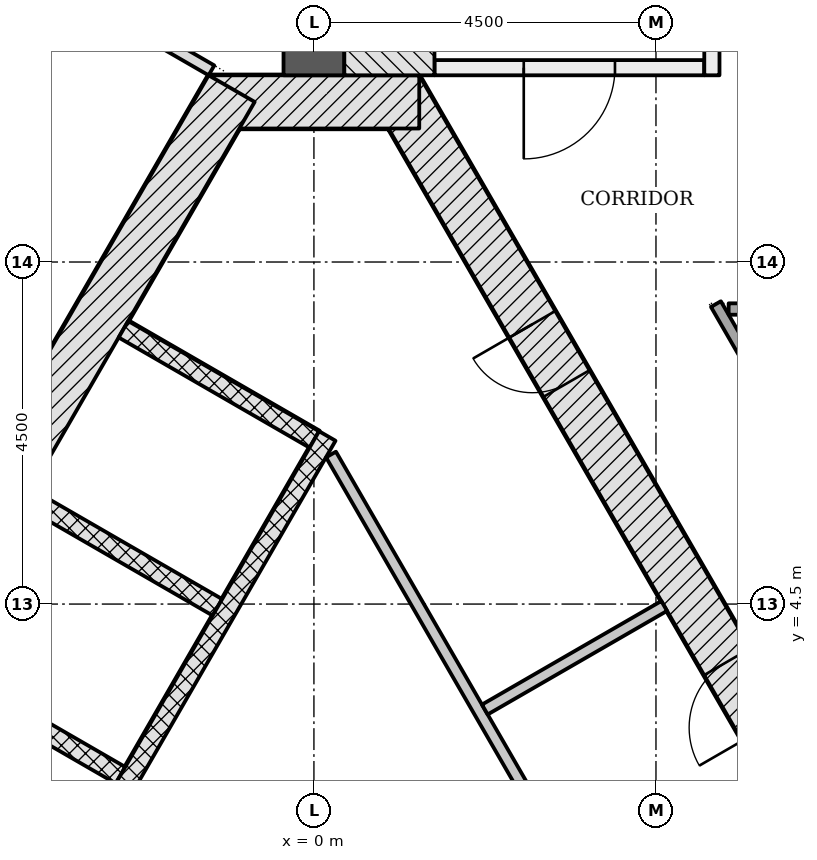
"""IFC4 building model, lengths in metres.
Left out: names, types, materials, properties, quantities, classifications, styles, units other than length and angle.
Written with IfcOpenShell. Run it as: python <this file> out.ifc"""

import sys

from ifc_helpers import new_model, si_unit, direction, frame, frame_2d, origin, place, context, subcontext, project, spatial, rectangle, extrude, element, fill, save


model = new_model("IFC4")
c1 = context("Model", 3, precision=1e-05, world=origin(), true_north=direction((0.0, 1.0)))
c2 = subcontext(c1, "Body", "Model", "MODEL_VIEW")
j1 = project(units=[si_unit("LENGTHUNIT", "METRE"), si_unit("PLANEANGLEUNIT", "RADIAN")], contexts=[c1])
p1 = place(None, origin())
s1 = spatial("IfcSite", under=j1, at=p1, CompositionType="ELEMENT")
p2 = place(p1, origin())
s2 = spatial("IfcBuilding", under=s1, at=p2, CompositionType="ELEMENT")
p3 = place(p2, frame((0.0, 0.0, 98.7)))
s3 = spatial("IfcBuildingStorey", under=s2, at=p3, CompositionType="ELEMENT", Elevation=98.7)
p4 = place(p3, frame((10.311, -4.703, -0.2), z_axis=(0.0, 0.0, 1.0), x_axis=(-0.500001446645, 0.866024568562, 0.0)))
e1 = element("IfcWall", 1, at=p4, inside=s3, PredefinedType="SHEAR", context=c2, shape_type="SweptSolid", body=[
    extrude(rectangle(XDim=18.458, YDim=0.7, at=frame_2d((9.229, 0.0))), origin(), (0.0, 0.0, 1.0), 3.6),
])
p5 = place(p4, frame((6.5, 0.0, 0.2)))
e2 = element("IfcOpeningElement", 2, at=p5, cuts=e1, PredefinedType="OPENING", context=c2, shape_type="SweptSolid", body=[
    extrude(rectangle(XDim=1.0, YDim=2.1, at=frame_2d((0.5, 1.05))), frame((0.0, 0.36, 0.0), z_axis=(0.0, -1.0, 0.0), x_axis=(1.0, 0.0, 0.0)), (0.0, 0.0, 1.0), 0.72),
])
p6 = place(p4, frame((2.902, 0.0, 0.2)))
e3 = element("IfcOpeningElement", 3, at=p6, cuts=e1, PredefinedType="OPENING", context=c2, shape_type="SweptSolid", body=[
    extrude(rectangle(XDim=0.9, YDim=2.1, at=frame_2d((0.45, 1.05))), frame((0.0, 0.36, 0.0), z_axis=(0.0, -1.0, 0.0), x_axis=(1.0, 0.0, 0.0)), (0.0, 0.0, 1.0), 0.72),
])
p7 = place(p4, frame((8.75, 0.0, 0.2)))
e4 = element("IfcOpeningElement", 4, at=p7, cuts=e1, PredefinedType="OPENING", context=c2, shape_type="SweptSolid", body=[
    extrude(rectangle(XDim=1.0, YDim=2.1, at=frame_2d((0.5, 1.05))), frame((0.0, 0.36, 0.0), z_axis=(0.0, -1.0, 0.0), x_axis=(1.0, 0.0, 0.0)), (0.0, 0.0, 1.0), 0.72),
])
p8 = place(p4, frame((13.977, 0.0, 0.2)))
e5 = element("IfcOpeningElement", 5, at=p8, cuts=e1, PredefinedType="OPENING", context=c2, shape_type="SweptSolid", body=[
    extrude(rectangle(XDim=0.9, YDim=2.1, at=frame_2d((0.45, 1.05))), frame((0.0, 0.36, 0.0), z_axis=(0.0, -1.0, 0.0), x_axis=(1.0, 0.0, 0.0)), (0.0, 0.0, 1.0), 0.72),
])
p9 = place(p3, frame((1.386, 11.106, -0.2), z_axis=(0.0, 0.0, 1.0), x_axis=(-1.0, 0.0, 0.0)))
e6 = element("IfcWall", 6, at=p9, inside=s3, PredefinedType="SHEAR", context=c2, shape_type="SweptSolid", body=[
    extrude(rectangle(XDim=2.771, YDim=0.7, at=frame_2d((1.386, 0.0))), origin(), (0.0, 0.0, 1.0), 3.6),
])
p10 = place(p3, frame((-1.083, 11.281, -0.2), z_axis=(0.0, 0.0, 1.0), x_axis=(-0.500001446645, -0.866024568562, 0.0)))
e7 = element("IfcWall", 7, at=p10, inside=s3, PredefinedType="SHEAR", context=c2, shape_type="SweptSolid", body=[
    extrude(rectangle(XDim=18.458, YDim=0.7, at=frame_2d((9.229, 0.0))), origin(), (0.0, 0.0, 1.0), 3.6),
])
p11 = place(p10, frame((8.979, 0.0, 0.2)))
e8 = element("IfcOpeningElement", 8, at=p11, cuts=e7, PredefinedType="OPENING", context=c2, shape_type="SweptSolid", body=[
    extrude(rectangle(XDim=1.2, YDim=2.1, at=frame_2d((0.6, 1.05))), frame((0.0, 0.36, 0.0), z_axis=(0.0, -1.0, 0.0), x_axis=(1.0, 0.0, 0.0)), (0.0, 0.0, 1.0), 0.72),
])
p12 = place(p10, frame((11.029, 0.0, 0.2)))
e9 = element("IfcOpeningElement", 9, at=p12, cuts=e7, PredefinedType="OPENING", context=c2, shape_type="SweptSolid", body=[
    extrude(rectangle(XDim=1.2, YDim=2.1, at=frame_2d((0.6, 1.05))), frame((0.0, 0.36, 0.0), z_axis=(0.0, -1.0, 0.0), x_axis=(1.0, 0.0, 0.0)), (0.0, 0.0, 1.0), 0.72),
])
p13 = place(p3, frame((0.0, 11.456, -0.2), z_axis=(0.0, 0.0, 1.0), x_axis=(0.0, 1.0, 0.0)))
e10 = element("IfcWall", 10, at=p13, inside=s3, PredefinedType="SHEAR", context=c2, shape_type="SweptSolid", body=[
    extrude(rectangle(XDim=12.678, YDim=0.8, at=frame_2d((6.339, 0.0))), origin(), (0.0, 0.0, 1.0), 3.6),
])
p14 = place(p3, frame((-2.506, 8.115, -0.2), z_axis=(0.0, 0.0, 1.0), x_axis=(0.865996321171, -0.50005036918, 0.0)))
e11 = element("IfcWall", 11, at=p14, inside=s3, PredefinedType="PARTITIONING", context=c2, shape_type="SweptSolid", body=[
    extrude(rectangle(XDim=2.9, YDim=0.25, at=frame_2d((1.45, 0.0))), origin(), (0.0, 0.0, 1.0), 3.6),
])
for number, where, z_axis, x_axis in (
    (12, (-3.781, 5.907, -0.2), (0.0, 0.0, 1.0), (0.866, -0.5, 0.0)),
    (13, (-5.056, 3.699, -0.2), (0.0, 0.0, 1.0), (0.866, -0.5, 0.0)),
):
    element("IfcWall", number, at=place(p3, frame(where, z_axis=z_axis, x_axis=x_axis)), inside=s3, PredefinedType="PARTITIONING", context=c2, shape_type="SweptSolid", body=[
        extrude(rectangle(XDim=2.9, YDim=0.25, at=frame_2d((1.45, 0.0))), origin(), (0.0, 0.0, 1.0), 3.6),
    ])
p15 = place(p3, frame((0.176, 6.711, 0.0), z_axis=(0.0, 0.0, 1.0), x_axis=(-0.500004227369, -0.866022963098, 0.0)))
e14 = element("IfcWall", 14, at=p15, inside=s3, PredefinedType="PARTITIONING", context=c2, shape_type="SweptSolid", body=[
    extrude(rectangle(XDim=11.8, YDim=0.25, at=frame_2d((5.9, 0.0))), origin(), (0.0, 0.0, 1.0), 3.4),
])
p16 = place(p3, frame((3.546, 0.715, 0.0), z_axis=(0.0, 0.0, 1.0), x_axis=(-0.50002895357, 0.866008686788, 0.0)))
e15 = element("IfcWall", 15, at=p16, inside=s3, PredefinedType="PARTITIONING", context=c2, shape_type="SweptSolid", body=[
    extrude(rectangle(XDim=6.642, YDim=0.15, at=frame_2d((3.321, 0.0))), origin(), (0.0, 0.0, 1.0), 3.4),
])
p17 = place(p3, frame((2.248, 3.112, 0.0), z_axis=(0.0, 0.0, 1.0), x_axis=(0.866012511928, 0.500022328685, 0.0)))
e16 = element("IfcWall", 16, at=p17, inside=s3, PredefinedType="PARTITIONING", context=c2, shape_type="SweptSolid", body=[
    extrude(rectangle(XDim=2.725, YDim=0.15, at=frame_2d((1.363, 0.0))), origin(), (0.0, 0.0, 1.0), 3.4),
])
p18 = place(p3, frame((5.135, 11.556, -0.2), z_axis=(0.0, 0.0, 1.0), x_axis=(-1.0, 0.0, 0.0)))
e17 = element("IfcWall", 17, at=p18, inside=s3, PredefinedType="SHEAR", context=c2, shape_type="SweptSolid", body=[
    extrude(rectangle(XDim=3.55, YDim=0.2, at=frame_2d((1.775, 0.0))), origin(), (0.0, 0.0, 1.0), 3.6),
])
p19 = place(p18, frame((1.175, 0.0, 0.2)))
e18 = element("IfcOpeningElement", 18, at=p19, cuts=e17, PredefinedType="OPENING", context=c2, shape_type="SweptSolid", body=[
    extrude(rectangle(XDim=1.2, YDim=2.1, at=frame_2d((0.6, 1.05))), frame((0.0, 0.11, 0.0), z_axis=(0.0, -1.0, 0.0), x_axis=(1.0, 0.0, 0.0)), (0.0, 0.0, 1.0), 0.22),
])
p20 = place(p3, frame((5.236, 11.456, -0.2), z_axis=(0.0, 0.0, 1.0), x_axis=(0.0, 1.0, 0.0)))
e19 = element("IfcWall", 19, at=p20, inside=s3, PredefinedType="SHEAR", context=c2, shape_type="SweptSolid", body=[
    extrude(rectangle(XDim=5.6, YDim=0.2, at=frame_2d((2.8, 0.0))), origin(), (0.0, 0.0, 1.0), 3.6),
])
p21 = place(p20, frame((0.45, 0.0, 0.2)))
e20 = element("IfcOpeningElement", 20, at=p21, cuts=e19, PredefinedType="OPENING", context=c2, shape_type="SweptSolid", body=[
    extrude(rectangle(XDim=1.2, YDim=2.1, at=frame_2d((0.6, 1.05))), frame((0.0, 0.11, 0.0), z_axis=(0.0, -1.0, 0.0), x_axis=(1.0, 0.0, 0.0)), (0.0, 0.0, 1.0), 0.22),
])
p22 = place(p3, frame((0.993, 11.456, -0.2), z_axis=(0.0, 0.0, 1.0), x_axis=(0.0, 1.0, 0.0)))
e21 = element("IfcWall", 21, at=p22, inside=s3, PredefinedType="SHEAR", context=c2, shape_type="SweptSolid", body=[
    extrude(rectangle(XDim=7.2, YDim=1.186, at=frame_2d((3.6, 0.0))), origin(), (0.0, 0.0, 1.0), 3.6),
])
p23 = place(p3, frame((5.289, 8.446, 0.0), z_axis=(0.0, 0.0, 1.0), x_axis=(0.499996620721, -0.866027354803, 0.0)))
e22 = element("IfcWall", 22, at=p23, inside=s3, PredefinedType="PARTITIONING", context=c2, shape_type="SweptSolid", body=[
    extrude(rectangle(XDim=15.057, YDim=0.15, at=frame_2d((7.528, 0.0))), origin(), (0.0, 0.0, 1.0), 2.778),
])
p24 = place(p23, frame((12.566, 0.0, 0.0)))
e23 = element("IfcOpeningElement", 23, at=p24, cuts=e22, PredefinedType="OPENING", context=c2, shape_type="SweptSolid", body=[
    extrude(rectangle(XDim=1.0, YDim=2.1, at=frame_2d((0.5, 1.05))), frame((0.0, 0.085, 0.0), z_axis=(0.0, -1.0, 0.0), x_axis=(1.0, 0.0, 0.0)), (0.0, 0.0, 1.0), 0.17),
])
p25 = place(p23, frame((7.316, 0.0, 0.0)))
e24 = element("IfcOpeningElement", 24, at=p25, cuts=e22, PredefinedType="OPENING", context=c2, shape_type="SweptSolid", body=[
    extrude(rectangle(XDim=1.0, YDim=2.1, at=frame_2d((0.5, 1.05))), frame((0.0, 0.085, 0.0), z_axis=(0.0, -1.0, 0.0), x_axis=(1.0, 0.0, 0.0)), (0.0, 0.0, 1.0), 0.17),
])
p26 = place(p23, frame((5.357, 0.0, 0.0)))
e25 = element("IfcOpeningElement", 25, at=p26, cuts=e22, PredefinedType="OPENING", context=c2, shape_type="SweptSolid", body=[
    extrude(rectangle(XDim=1.0, YDim=2.1, at=frame_2d((0.5, 1.05))), frame((0.0, 0.085, 0.0), z_axis=(0.0, -1.0, 0.0), x_axis=(1.0, 0.0, 0.0)), (0.0, 0.0, 1.0), 0.17),
])
p27 = place(p3, frame((-4.379, 13.271, 0.0), z_axis=(0.0, 0.0, 1.0), x_axis=(0.866019471182, -0.500010275428, 0.0)))
e26 = element("IfcWall", 26, at=p27, inside=s3, PredefinedType="PARTITIONING", context=c2, shape_type="SweptSolid", body=[
    extrude(rectangle(XDim=3.5, YDim=0.15, at=frame_2d((1.75, 0.0))), origin(), (0.0, 0.0, 1.0), 3.4),
])
p28 = place(p3, frame((5.456, 8.381, 0.0), z_axis=(0.0, 0.0, 1.0), x_axis=(1.0, 0.0, 0.0)))
e27 = element("IfcWall", 27, at=p28, inside=s3, PredefinedType="PARTITIONING", context=c2, shape_type="SweptSolid", body=[
    extrude(rectangle(XDim=1.88, YDim=0.15, at=frame_2d((0.94, 0.0))), origin(), (0.0, 0.0, 1.0), 3.4),
])
p29 = place(p7, origin())
e28 = element("IfcDoor", 28, at=p29, inside=s3, OperationType="SINGLE_SWING_LEFT", PredefinedType="DOOR", context=c2, shape_type="SweptSolid", body=[
    extrude(rectangle(XDim=1.0, YDim=2.1, at=frame_2d((0.5, 1.05))), frame((0.0, 0.075, 0.0), z_axis=(0.0, -1.0, 0.0), x_axis=(1.0, 0.0, 0.0)), (0.0, 0.0, 1.0), 0.15),
])
fill(e4, e28)
p30 = place(p8, origin())
e29 = element("IfcDoor", 29, at=p30, inside=s3, OperationType="SINGLE_SWING_RIGHT", PredefinedType="DOOR", context=c2, shape_type="SweptSolid", body=[
    extrude(rectangle(XDim=0.9, YDim=2.1, at=frame_2d((0.45, 1.05))), frame((0.0, 0.075, 0.0), z_axis=(0.0, -1.0, 0.0), x_axis=(1.0, 0.0, 0.0)), (0.0, 0.0, 1.0), 0.15),
])
fill(e5, e29)
p31 = place(p19, origin())
e30 = element("IfcDoor", 30, at=p31, inside=s3, OperationType="SINGLE_SWING_RIGHT", PredefinedType="DOOR", context=c2, shape_type="SweptSolid", body=[
    extrude(rectangle(XDim=1.2, YDim=2.1, at=frame_2d((0.6, 1.05))), frame((0.0, 0.025, 0.0), z_axis=(0.0, -1.0, 0.0), x_axis=(1.0, 0.0, 0.0)), (0.0, 0.0, 1.0), 0.05),
])
fill(e18, e30)
save(model, sys.argv[1])
